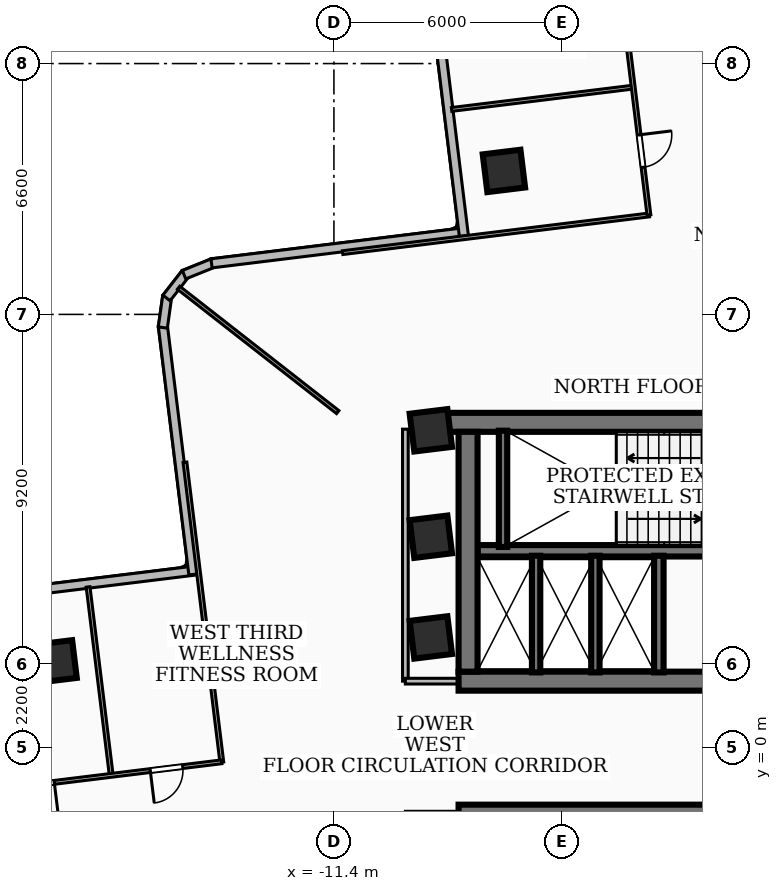
"""IFC4 building model, lengths in metres.
Left out: names, types, materials, properties, quantities, classifications, styles, units other than length and angle.
Written with IfcOpenShell. Run it as: python <this file> out.ifc"""

import sys

from ifc_helpers import new_model, si_unit, direction, frame, frame_2d, origin, origin_2d, place, context, subcontext, project, spatial, rectangle, extrude, element, fill, save


model = new_model("IFC4")
c1 = context("Model", 3, precision=1e-05, world=origin(), true_north=direction((0.0, 1.0)))
c2 = subcontext(c1, "Body", "Model", "MODEL_VIEW")
j1 = project(units=[si_unit("LENGTHUNIT", "METRE"), si_unit("PLANEANGLEUNIT", "RADIAN")], contexts=[c1])
p1 = place(None, origin())
s1 = spatial("IfcSite", under=j1, at=p1, CompositionType="ELEMENT")
p2 = place(p1, origin())
s2 = spatial("IfcBuilding", under=s1, at=p2, CompositionType="ELEMENT")
p3 = place(p2, frame((0.0, 0.0, 82.08)))
s3 = spatial("IfcBuildingStorey", under=s2, at=p3, CompositionType="ELEMENT", Elevation=82.08)
p4 = place(p3, frame((-8.78, 8.56, 0.0), z_axis=(0.0, 0.0, 1.0), x_axis=(1.0, 0.0, 0.0)))
e1 = element("IfcWall", 1, at=p4, inside=s3, PredefinedType="SHEAR", context=c2, shape_type="SweptSolid", body=[
    extrude(rectangle(XDim=17.56, YDim=0.5, at=frame_2d((8.78, 0.0))), origin(), (0.0, 0.0, 1.0), 3.34),
])
p5 = place(p3, frame((8.12, 1.75, 0.0), z_axis=(0.0, 0.0, 1.0), x_axis=(-1.0, 0.0, 0.0)))
e2 = element("IfcWall", 2, at=p5, inside=s3, PredefinedType="SHEAR", context=c2, shape_type="SweptSolid", body=[
    extrude(rectangle(XDim=16.24, YDim=0.5, at=frame_2d((8.12, 0.0))), origin(), (0.0, 0.0, 1.0), 3.34),
])
p6 = place(p5, frame((7.45, 0.0, 0.0)))
e3 = element("IfcOpeningElement", 3, at=p6, cuts=e2, PredefinedType="OPENING", context=c2, shape_type="SweptSolid", body=[
    extrude(rectangle(XDim=1.0, YDim=2.1, at=frame_2d((0.5, 1.05))), frame((0.0, 0.26, 0.0), z_axis=(0.0, -1.0, 0.0), x_axis=(1.0, 0.0, 0.0)), (0.0, 0.0, 1.0), 0.52),
])
p7 = place(p5, frame((3.85, 0.0, 0.0)))
e4 = element("IfcOpeningElement", 4, at=p7, cuts=e2, PredefinedType="OPENING", context=c2, shape_type="SweptSolid", body=[
    extrude(rectangle(XDim=0.9, YDim=2.06, at=frame_2d((0.45, 1.03))), frame((0.0, 0.26, 0.0), z_axis=(0.0, -1.0, 0.0), x_axis=(1.0, 0.0, 0.0)), (0.0, 0.0, 1.0), 0.52),
])
p8 = place(p5, frame((2.35, 0.0, 0.0)))
e5 = element("IfcOpeningElement", 5, at=p8, cuts=e2, PredefinedType="OPENING", context=c2, shape_type="SweptSolid", body=[
    extrude(rectangle(XDim=0.9, YDim=2.06, at=frame_2d((0.45, 1.03))), frame((0.0, 0.26, 0.0), z_axis=(0.0, -1.0, 0.0), x_axis=(1.0, 0.0, 0.0)), (0.0, 0.0, 1.0), 0.52),
])
p9 = place(p5, frame((0.8, 0.0, 0.0)))
e6 = element("IfcOpeningElement", 6, at=p9, cuts=e2, PredefinedType="OPENING", context=c2, shape_type="SweptSolid", body=[
    extrude(rectangle(XDim=0.9, YDim=2.06, at=frame_2d((0.45, 1.03))), frame((0.0, 0.26, 0.0), z_axis=(0.0, -1.0, 0.0), x_axis=(1.0, 0.0, 0.0)), (0.0, 0.0, 1.0), 0.52),
])
p10 = place(p3, frame((-7.87, 2.0, 0.0), z_axis=(0.0, 0.0, 1.0), x_axis=(0.0, 1.0, 0.0)))
e7 = element("IfcWall", 7, at=p10, inside=s3, PredefinedType="SHEAR", context=c2, shape_type="SweptSolid", body=[
    extrude(rectangle(XDim=6.31, YDim=0.5, at=frame_2d((3.155, 0.0))), origin(), (0.0, 0.0, 1.0), 3.34),
])
p11 = place(p3, frame((7.62, 5.18, 0.0), z_axis=(0.0, 0.0, 1.0), x_axis=(-1.0, 0.0, 0.0)))
e8 = element("IfcWall", 8, at=p11, inside=s3, PredefinedType="SOLIDWALL", context=c2, shape_type="SweptSolid", body=[
    extrude(rectangle(XDim=15.24, YDim=0.3, at=frame_2d((7.62, 0.0))), origin(), (0.0, 0.0, 1.0), 3.34),
])
p12 = place(p11, frame((5.77, 0.0, 0.0)))
e9 = element("IfcOpeningElement", 9, at=p12, cuts=e8, PredefinedType="OPENING", context=c2, shape_type="SweptSolid", body=[
    extrude(rectangle(XDim=1.1, YDim=2.15, at=frame_2d((0.55, 1.075))), frame((0.0, 0.16, 0.0), z_axis=(0.0, -1.0, 0.0), x_axis=(1.0, 0.0, 0.0)), (0.0, 0.0, 1.0), 0.32),
])
p13 = place(p11, frame((2.97, 0.0, 0.0)))
e10 = element("IfcOpeningElement", 10, at=p13, cuts=e8, PredefinedType="OPENING", context=c2, shape_type="SweptSolid", body=[
    extrude(rectangle(XDim=1.1, YDim=2.15, at=frame_2d((0.55, 1.075))), frame((0.0, 0.16, 0.0), z_axis=(0.0, -1.0, 0.0), x_axis=(1.0, 0.0, 0.0)), (0.0, 0.0, 1.0), 0.32),
])
p14 = place(p11, frame((7.97, 0.0, 0.0)))
e11 = element("IfcOpeningElement", 11, at=p14, cuts=e8, PredefinedType="OPENING", context=c2, shape_type="SweptSolid", body=[
    extrude(rectangle(XDim=1.0, YDim=2.1, at=frame_2d((0.5, 1.05))), frame((0.0, 0.16, 0.0), z_axis=(0.0, -1.0, 0.0), x_axis=(1.0, 0.0, 0.0)), (0.0, 0.0, 1.0), 0.32),
])
p15 = place(p3, frame((-8.12, -1.75, 0.0), z_axis=(0.0, 0.0, 1.0), x_axis=(1.0, 0.0, 0.0)))
e12 = element("IfcWall", 12, at=p15, inside=s3, PredefinedType="SHEAR", context=c2, shape_type="SweptSolid", body=[
    extrude(rectangle(XDim=16.24, YDim=0.5, at=frame_2d((8.12, 0.0))), origin(), (0.0, 0.0, 1.0), 3.34),
])
p16 = place(p15, frame((7.45, 0.0, 0.0)))
e13 = element("IfcOpeningElement", 13, at=p16, cuts=e12, PredefinedType="OPENING", context=c2, shape_type="SweptSolid", body=[
    extrude(rectangle(XDim=1.0, YDim=2.1, at=frame_2d((0.5, 1.05))), frame((0.0, 0.26, 0.0), z_axis=(0.0, -1.0, 0.0), x_axis=(1.0, 0.0, 0.0)), (0.0, 0.0, 1.0), 0.52),
])
p17 = place(p15, frame((10.965, 0.0, 0.0)))
e14 = element("IfcOpeningElement", 14, at=p17, cuts=e12, PredefinedType="OPENING", context=c2, shape_type="SweptSolid", body=[
    extrude(rectangle(XDim=1.05, YDim=2.15, at=frame_2d((0.525, 1.075))), frame((0.0, 0.26, 0.0), z_axis=(0.0, -1.0, 0.0), x_axis=(1.0, 0.0, 0.0)), (0.0, 0.0, 1.0), 0.52),
])
p18 = place(p15, frame((12.525, 0.0, 0.0)))
e15 = element("IfcOpeningElement", 15, at=p18, cuts=e12, PredefinedType="OPENING", context=c2, shape_type="SweptSolid", body=[
    extrude(rectangle(XDim=1.05, YDim=2.15, at=frame_2d((0.525, 1.075))), frame((0.0, 0.26, 0.0), z_axis=(0.0, -1.0, 0.0), x_axis=(1.0, 0.0, 0.0)), (0.0, 0.0, 1.0), 0.52),
])
p19 = place(p15, frame((14.085, 0.0, 0.0)))
e16 = element("IfcOpeningElement", 16, at=p19, cuts=e12, PredefinedType="OPENING", context=c2, shape_type="SweptSolid", body=[
    extrude(rectangle(XDim=1.05, YDim=2.15, at=frame_2d((0.525, 1.075))), frame((0.0, 0.26, 0.0), z_axis=(0.0, -1.0, 0.0), x_axis=(1.0, 0.0, 0.0)), (0.0, 0.0, 1.0), 0.52),
])
p20 = place(p3, frame((-6.95, 5.28, 0.0), z_axis=(0.0, 0.0, 1.0), x_axis=(0.0, 1.0, 0.0)))
e17 = element("IfcWall", 17, at=p20, inside=s3, PredefinedType="SOLIDWALL", context=c2, shape_type="SweptSolid", body=[
    extrude(rectangle(XDim=3.06, YDim=0.22, at=frame_2d((1.53, 0.0))), origin(), (0.0, 0.0, 1.0), 3.34),
])
p21 = place(p3, frame((-2.85, 1.98, 0.0), z_axis=(0.0, 0.0, 1.0), x_axis=(0.0, 1.0, 0.0)))
e18 = element("IfcWall", 18, at=p21, inside=s3, PredefinedType="SOLIDWALL", context=c2, shape_type="SweptSolid", body=[
    extrude(rectangle(XDim=3.07, YDim=0.25, at=frame_2d((1.535, 0.0))), origin(), (0.0, 0.0, 1.0), 3.34),
])
for number, where, z_axis, x_axis in (
    (19, (-6.08, 1.98, 0.0), (0.0, 0.0, 1.0), (0.0, 1.0, 0.0)),
    (20, (-4.52, 1.98, 0.0), (0.0, 0.0, 1.0), (0.0, 1.0, 0.0)),
):
    element("IfcWall", number, at=place(p3, frame(where, z_axis=z_axis, x_axis=x_axis)), inside=s3, PredefinedType="SOLIDWALL", context=c2, shape_type="SweptSolid", body=[
        extrude(rectangle(XDim=3.07, YDim=0.22, at=frame_2d((1.535, 0.0))), origin(), (0.0, 0.0, 1.0), 3.34),
    ])
for number, where, z_axis, x_axis in (
    (21, (-8.85, 2.9, 0.0), (0.0, 0.0, 1.0), (0.993, 0.122, 0.0)),
    (22, (-8.85, 5.55, 0.0), (0.0, 0.0, 1.0), (0.993, 0.122, 0.0)),
    (23, (-8.85, 8.35, 0.0), (0.0, 0.0, 1.0), (0.993, 0.122, 0.0)),
    (24, (-6.927, 15.175, 0.0), (0.0, 0.0, 1.0), (0.993, 0.122, 0.0)),
    (25, (-18.724, 2.271, 0.0), (0.0, 0.0, 1.0), (0.993, 0.122, 0.0)),
):
    element("IfcColumn", number, at=place(p3, frame(where, z_axis=z_axis, x_axis=x_axis)), inside=s3, PredefinedType="COLUMN", context=c2, shape_type="SweptSolid", body=[
        extrude(rectangle(XDim=1.0, YDim=1.0, at=origin_2d()), origin(), (0.0, 0.0, 1.0), 3.6),
    ])
p22 = place(p3, frame((-31.169, 2.682, 0.0), z_axis=(0.0, 0.0, 1.0), x_axis=(0.992548484973, 0.121850338438, 0.0)))
e26 = element("IfcWall", 26, at=p22, inside=s3, PredefinedType="SOLIDWALL", context=c2, shape_type="SweptSolid", body=[
    extrude(rectangle(XDim=16.275, YDim=0.24, at=frame_2d((8.138, 0.0))), origin(), (0.0, 0.0, 1.0), 3.34),
])
p23 = place(p22, frame((1.1, 0.0, 0.85)))
e27 = element("IfcOpeningElement", 27, at=p23, cuts=e26, PredefinedType="OPENING", context=c2, shape_type="SweptSolid", body=[
    extrude(rectangle(XDim=2.1, YDim=2.0, at=frame_2d((1.05, 1.0))), frame((0.0, 0.13, 0.0), z_axis=(0.0, -1.0, 0.0), x_axis=(1.0, 0.0, 0.0)), (0.0, 0.0, 1.0), 0.26),
])
p24 = place(p3, frame((-15.098, 4.558, 0.0), z_axis=(0.0, 0.0, 1.0), x_axis=(-0.121938646341, 0.992537639855, 0.0)))
e28 = element("IfcWall", 28, at=p24, inside=s3, PredefinedType="SOLIDWALL", context=c2, shape_type="SweptSolid", body=[
    extrude(rectangle(XDim=6.595, YDim=0.24, at=frame_2d((3.298, 0.0))), origin(), (0.0, 0.0, 1.0), 3.34),
])
p25 = place(p3, frame((-15.902, 11.054, 0.0), z_axis=(0.0, 0.0, 1.0), x_axis=(0.138376981782, 0.990379629694, 0.0)))
e29 = element("IfcWall", 29, at=p25, inside=s3, PredefinedType="SOLIDWALL", context=c2, shape_type="SweptSolid", body=[
    extrude(rectangle(XDim=0.831, YDim=0.24, at=frame_2d((0.416, 0.0))), origin(), (0.0, 0.0, 1.0), 3.34),
])
p26 = place(p3, frame((-15.805, 11.832, 0.0), z_axis=(0.0, 0.0, 1.0), x_axis=(0.614397431824, 0.788996702001, 0.0)))
e30 = element("IfcWall", 30, at=p26, inside=s3, PredefinedType="SOLIDWALL", context=c2, shape_type="SweptSolid", body=[
    extrude(rectangle(XDim=0.814, YDim=0.24, at=frame_2d((0.407, 0.0))), origin(), (0.0, 0.0, 1.0), 3.34),
])
p27 = place(p3, frame((-15.343, 12.445, 0.0), z_axis=(0.0, 0.0, 1.0), x_axis=(0.927724225254, 0.37326634174, 0.0)))
e31 = element("IfcWall", 31, at=p27, inside=s3, PredefinedType="SOLIDWALL", context=c2, shape_type="SweptSolid", body=[
    extrude(rectangle(XDim=0.83, YDim=0.24, at=frame_2d((0.415, 0.0))), origin(), (0.0, 0.0, 1.0), 3.34),
])
p28 = place(p3, frame((-14.621, 12.743, 0.0), z_axis=(0.0, 0.0, 1.0), x_axis=(0.992536263595, 0.121949848087, 0.0)))
e32 = element("IfcWall", 32, at=p28, inside=s3, PredefinedType="SOLIDWALL", context=c2, shape_type="SweptSolid", body=[
    extrude(rectangle(XDim=6.775, YDim=0.24, at=frame_2d((3.387, 0.0))), origin(), (0.0, 0.0, 1.0), 3.34),
])
p29 = place(p3, frame((-7.98, 13.462, 0.0), z_axis=(0.0, 0.0, 1.0), x_axis=(-0.12189689255, 0.992542768644, 0.0)))
e33 = element("IfcWall", 33, at=p29, inside=s3, PredefinedType="SOLIDWALL", context=c2, shape_type="SweptSolid", body=[
    extrude(rectangle(XDim=12.075, YDim=0.24, at=frame_2d((6.038, 0.0))), origin(), (0.0, 0.0, 1.0), 3.34),
])
p30 = place(p29, frame((9.475, 0.0, 0.85)))
e34 = element("IfcOpeningElement", 34, at=p30, cuts=e33, PredefinedType="OPENING", context=c2, shape_type="SweptSolid", body=[
    extrude(rectangle(XDim=1.5, YDim=1.8, at=frame_2d((0.75, 0.9))), frame((0.0, 0.13, 0.0), z_axis=(0.0, -1.0, 0.0), x_axis=(1.0, 0.0, 0.0)), (0.0, 0.0, 1.0), 0.26),
])
p31 = place(p3, frame((-9.52, 1.75, 0.0), z_axis=(0.0, 0.0, 1.0), x_axis=(0.0, 1.0, 0.0)))
e35 = element("IfcWall", 35, at=p31, inside=s3, PredefinedType="PARTITIONING", context=c2, shape_type="SweptSolid", body=[
    extrude(rectangle(XDim=6.63, YDim=0.15, at=frame_2d((3.315, 0.0))), origin(), (0.0, 0.0, 1.0), 2.486),
])
for number, where, z_axis, x_axis in (
    (36, (-7.85, 1.75, 0.0), (0.0, 0.0, 1.0), (-1.0, 0.0, 0.0)),
    (37, (-7.85, -1.75, 0.0), (0.0, 0.0, 1.0), (-1.0, 0.0, 0.0)),
):
    element("IfcWall", number, at=place(p3, frame(where, z_axis=z_axis, x_axis=x_axis)), inside=s3, PredefinedType="PARTITIONING", context=c2, shape_type="SweptSolid", body=[
        extrude(rectangle(XDim=1.67, YDim=0.15, at=frame_2d((0.835, 0.0))), origin(), (0.0, 0.0, 1.0), 2.405),
    ])
p32 = place(p3, frame((-11.3, 8.829, 0.0), z_axis=(0.0, 0.0, 1.0), x_axis=(-0.788014623364, 0.61565652223, 0.0)))
e38 = element("IfcWall", 38, at=p32, inside=s3, PredefinedType="PARTITIONING", context=c2, shape_type="SweptSolid", body=[
    extrude(rectangle(XDim=5.315, YDim=0.1, at=frame_2d((2.657, 0.0))), origin(), (0.0, 0.0, 1.0), 3.34),
])
p33 = place(p3, frame((-3.101, 14.017, 0.0), z_axis=(0.0, 0.0, 1.0), x_axis=(-0.992524448483, -0.122045971517, 0.0)))
e39 = element("IfcWall", 39, at=p33, inside=s3, PredefinedType="PARTITIONING", context=c2, shape_type="SweptSolid", body=[
    extrude(rectangle(XDim=8.13, YDim=0.1, at=frame_2d((4.065, 0.0))), origin(), (0.0, 0.0, 1.0), 2.486),
])
p34 = place(p3, frame((-3.544, 17.378, 0.0), z_axis=(0.0, 0.0, 1.0), x_axis=(-0.992530372873, -0.121997782455, 0.0)))
e40 = element("IfcWall", 40, at=p34, inside=s3, PredefinedType="PARTITIONING", context=c2, shape_type="SweptSolid", body=[
    extrude(rectangle(XDim=4.795, YDim=0.1, at=frame_2d((2.397, 0.0))), origin(), (0.0, 0.0, 1.0), 2.486),
])
p35 = place(p3, frame((-4.008, 21.32, 0.0), z_axis=(0.0, 0.0, 1.0), x_axis=(0.12187066259, -0.992545989665, 0.0)))
e41 = element("IfcWall", 41, at=p35, inside=s3, PredefinedType="PARTITIONING", context=c2, shape_type="SweptSolid", body=[
    extrude(rectangle(XDim=7.36, YDim=0.1, at=frame_2d((3.68, 0.0))), origin(), (0.0, 0.0, 1.0), 3.34),
])
p36 = place(p35, frame((5.235, 0.0, 0.0)))
e42 = element("IfcOpeningElement", 42, at=p36, cuts=e41, PredefinedType="OPENING", context=c2, shape_type="SweptSolid", body=[
    extrude(rectangle(XDim=0.86, YDim=2.04, at=frame_2d((0.43, 1.02))), frame((0.0, 0.06, 0.0), z_axis=(0.0, -1.0, 0.0), x_axis=(1.0, 0.0, 0.0)), (0.0, 0.0, 1.0), 0.12),
])
p37 = place(p35, frame((1.555, 0.0, 0.0)))
e43 = element("IfcOpeningElement", 43, at=p37, cuts=e41, PredefinedType="OPENING", context=c2, shape_type="SweptSolid", body=[
    extrude(rectangle(XDim=0.86, YDim=2.04, at=frame_2d((0.43, 1.02))), frame((0.0, 0.06, 0.0), z_axis=(0.0, -1.0, 0.0), x_axis=(1.0, 0.0, 0.0)), (0.0, 0.0, 1.0), 0.12),
])
p38 = place(p3, frame((-15.32, 7.509, 0.0), z_axis=(0.0, 0.0, 1.0), x_axis=(0.122001160868, -0.992529957607, 0.0)))
e44 = element("IfcWall", 44, at=p38, inside=s3, PredefinedType="PARTITIONING", context=c2, shape_type="SweptSolid", body=[
    extrude(rectangle(XDim=7.95, YDim=0.1, at=frame_2d((3.975, 0.0))), origin(), (0.0, 0.0, 1.0), 2.486),
])
p39 = place(p3, frame((-17.869, 4.229, 0.0), z_axis=(0.0, 0.0, 1.0), x_axis=(0.121993075508, -0.992530951421, 0.0)))
e45 = element("IfcWall", 45, at=p39, inside=s3, PredefinedType="PARTITIONING", context=c2, shape_type="SweptSolid", body=[
    extrude(rectangle(XDim=4.975, YDim=0.1, at=frame_2d((2.488, 0.0))), origin(), (0.0, 0.0, 1.0), 2.486),
])
p40 = place(p3, frame((-14.352, -0.372, 0.0), z_axis=(0.0, 0.0, 1.0), x_axis=(-0.992547411675, -0.121859080812, 0.0)))
e46 = element("IfcWall", 46, at=p40, inside=s3, PredefinedType="PARTITIONING", context=c2, shape_type="SweptSolid", body=[
    extrude(rectangle(XDim=6.81, YDim=0.1, at=frame_2d((3.405, 0.0))), origin(), (0.0, 0.0, 1.0), 3.34),
])
p41 = place(p40, frame((1.035, 0.0, 0.0)))
e47 = element("IfcOpeningElement", 47, at=p41, cuts=e46, PredefinedType="OPENING", context=c2, shape_type="SweptSolid", body=[
    extrude(rectangle(XDim=0.86, YDim=2.04, at=frame_2d((0.43, 1.02))), frame((0.0, 0.06, 0.0), z_axis=(0.0, -1.0, 0.0), x_axis=(1.0, 0.0, 0.0)), (0.0, 0.0, 1.0), 0.12),
])
p42 = place(p40, frame((4.44, 0.0, 0.0)))
e48 = element("IfcOpeningElement", 48, at=p42, cuts=e46, PredefinedType="OPENING", context=c2, shape_type="SweptSolid", body=[
    extrude(rectangle(XDim=0.86, YDim=2.04, at=frame_2d((0.43, 1.02))), frame((0.0, 0.06, 0.0), z_axis=(0.0, -1.0, 0.0), x_axis=(1.0, 0.0, 0.0)), (0.0, 0.0, 1.0), 0.12),
])
p43 = place(p36, origin())
e49 = element("IfcDoor", 49, at=p43, inside=s3, OperationType="SINGLE_SWING_LEFT", PredefinedType="DOOR", context=c2, shape_type="SweptSolid", body=[
    extrude(rectangle(XDim=0.86, YDim=2.04, at=frame_2d((0.43, 1.02))), frame((0.0, 0.025, 0.0), z_axis=(0.0, -1.0, 0.0), x_axis=(1.0, 0.0, 0.0)), (0.0, 0.0, 1.0), 0.05),
])
fill(e42, e49)
p44 = place(p41, origin())
e50 = element("IfcDoor", 50, at=p44, inside=s3, OperationType="SINGLE_SWING_RIGHT", PredefinedType="DOOR", context=c2, shape_type="SweptSolid", body=[
    extrude(rectangle(XDim=0.86, YDim=2.04, at=frame_2d((0.43, 1.02))), frame((0.0, 0.025, 0.0), z_axis=(0.0, -1.0, 0.0), x_axis=(1.0, 0.0, 0.0)), (0.0, 0.0, 1.0), 0.05),
])
fill(e47, e50)
p45 = place(p42, origin())
e51 = element("IfcDoor", 51, at=p45, inside=s3, OperationType="SINGLE_SWING_LEFT", PredefinedType="DOOR", context=c2, shape_type="SweptSolid", body=[
    extrude(rectangle(XDim=0.86, YDim=2.04, at=frame_2d((0.43, 1.02))), frame((0.0, 0.025, 0.0), z_axis=(0.0, -1.0, 0.0), x_axis=(1.0, 0.0, 0.0)), (0.0, 0.0, 1.0), 0.05),
])
fill(e48, e51)
save(model, sys.argv[1])
